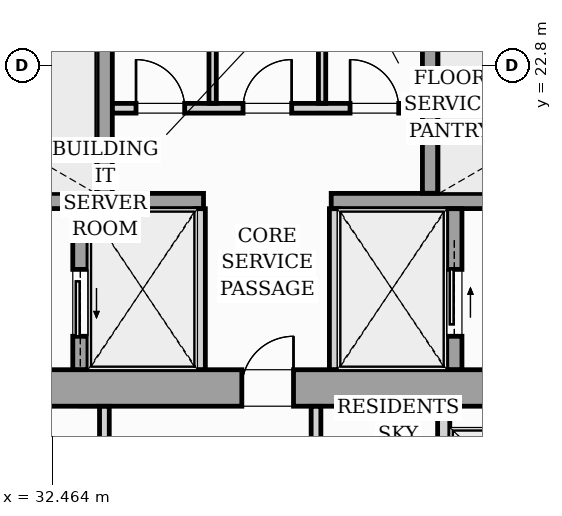
"""IFC4 building model, lengths in metres.
Left out: names, types, materials, properties, quantities, classifications, styles, units other than length and angle.
Written with IfcOpenShell. Run it as: python <this file> out.ifc"""

import sys

from ifc_helpers import new_model, si_unit, direction, frame, frame_2d, origin, origin_2d, place, context, subcontext, project, spatial, rectangle, i_section, extrude, source, transform, mapped, element, fill, save


model = new_model("IFC4")
c1 = context("Model", 3, precision=1e-05, world=origin(), true_north=direction((0.0, 1.0)))
c2 = subcontext(c1, "Body", "Model", "MODEL_VIEW")
j1 = project(units=[si_unit("LENGTHUNIT", "METRE"), si_unit("PLANEANGLEUNIT", "RADIAN")], contexts=[c1])
p1 = place(None, origin())
s1 = spatial("IfcSite", under=j1, at=p1, CompositionType="ELEMENT")
p2 = place(p1, origin())
s2 = spatial("IfcBuilding", under=s1, at=p2, CompositionType="ELEMENT")
p3 = place(p2, frame((0.0, 0.0, 219.9)))
s3 = spatial("IfcBuildingStorey", under=s2, at=p3, CompositionType="ELEMENT", Elevation=219.9)
m1 = source(origin(), c2, "Body", "SweptSolid", [
    extrude(i_section(OverallWidth=0.409, OverallDepth=0.425, WebThickness=0.033, FlangeThickness=0.052, FilletRadius=0.018, at=origin_2d()), origin(), (0.0, 0.0, 1.0), 3.296),
])
for number, where, z_axis, x_axis in (
    (1, (33.12, 17.4, 0.002), (0.0, 0.0, 1.0), (1.0, 0.0, 0.0)),
    (2, (38.88, 17.4, 0.002), (0.0, 0.0, 1.0), (1.0, 0.0, 0.0)),
):
    element("IfcColumn", number, at=place(p3, frame(where, z_axis=z_axis, x_axis=x_axis)), inside=s3, PredefinedType="PILASTER", context=c2, shape_type="MappedRepresentation", body=[
        mapped(m1, transform((0.0, 0.0, 0.0), scale=1.0)),
    ])
p4 = place(p3, frame((26.2, 17.5, 0.0), z_axis=(0.0, 0.0, 1.0), x_axis=(1.0, 0.0, 0.0)))
e3 = element("IfcWall", 3, at=p4, inside=s3, PredefinedType="SHEAR", context=c2, shape_type="SweptSolid", body=[
    extrude(rectangle(XDim=19.6, YDim=0.6, at=frame_2d((9.8, 0.0))), origin(), (0.0, 0.0, 1.0), 3.3),
])
p5 = place(p4, frame((0.95, 0.0, 0.0)))
e4 = element("IfcOpeningElement", 4, at=p5, cuts=e3, PredefinedType="OPENING", context=c2, shape_type="SweptSolid", body=[
    extrude(rectangle(XDim=0.95, YDim=2.06, at=frame_2d((0.475, 1.03))), frame((0.0, 0.31, 0.0), z_axis=(0.0, -1.0, 0.0), x_axis=(1.0, 0.0, 0.0)), (0.0, 0.0, 1.0), 0.62),
])
p6 = place(p4, frame((9.38, 0.0, 0.0)))
e5 = element("IfcOpeningElement", 5, at=p6, cuts=e3, PredefinedType="OPENING", context=c2, shape_type="SweptSolid", body=[
    extrude(rectangle(XDim=0.85, YDim=2.0, at=frame_2d((0.425, 1.0))), frame((0.0, 0.31, 0.0), z_axis=(0.0, -1.0, 0.0), x_axis=(1.0, 0.0, 0.0)), (0.0, 0.0, 1.0), 0.62),
])
p7 = place(p4, frame((17.55, 0.0, 0.0)))
e6 = element("IfcOpeningElement", 6, at=p7, cuts=e3, PredefinedType="OPENING", context=c2, shape_type="SweptSolid", body=[
    extrude(rectangle(XDim=0.95, YDim=2.06, at=frame_2d((0.475, 1.03))), frame((0.0, 0.31, 0.0), z_axis=(0.0, -1.0, 0.0), x_axis=(1.0, 0.0, 0.0)), (0.0, 0.0, 1.0), 0.62),
])
p8 = place(p3, frame((26.802, 20.575, 0.0), z_axis=(0.0, 0.0, 1.0), x_axis=(1.0, 0.0, 0.0)))
e7 = element("IfcWall", 7, at=p8, inside=s3, PredefinedType="SOLIDWALL", context=c2, shape_type="SweptSolid", body=[
    extrude(rectangle(XDim=8.148, YDim=0.25, at=frame_2d((4.074, 0.0))), origin(), (0.0, 0.0, 1.0), 3.3),
])
p9 = place(p8, frame((0.298, 0.0, 0.0)))
e8 = element("IfcOpeningElement", 8, at=p9, cuts=e7, PredefinedType="OPENING", context=c2, shape_type="SweptSolid", body=[
    extrude(rectangle(XDim=0.95, YDim=2.06, at=frame_2d((0.475, 1.03))), frame((0.0, 0.135, 0.0), z_axis=(0.0, -1.0, 0.0), x_axis=(1.0, 0.0, 0.0)), (0.0, 0.0, 1.0), 0.27),
])
p10 = place(p3, frame((37.05, 20.575, 0.0), z_axis=(0.0, 0.0, 1.0), x_axis=(1.0, 0.0, 0.0)))
e9 = element("IfcWall", 9, at=p10, inside=s3, PredefinedType="SOLIDWALL", context=c2, shape_type="SweptSolid", body=[
    extrude(rectangle(XDim=8.148, YDim=0.25, at=frame_2d((4.074, 0.0))), origin(), (0.0, 0.0, 1.0), 3.3),
])
p11 = place(p10, frame((6.6, 0.0, 0.0)))
e10 = element("IfcOpeningElement", 10, at=p11, cuts=e9, PredefinedType="OPENING", context=c2, shape_type="SweptSolid", body=[
    extrude(rectangle(XDim=0.95, YDim=2.06, at=frame_2d((0.475, 1.03))), frame((0.0, 0.135, 0.0), z_axis=(0.0, -1.0, 0.0), x_axis=(1.0, 0.0, 0.0)), (0.0, 0.0, 1.0), 0.27),
])
for number, where, z_axis, x_axis in (
    (11, (33.325, 20.702, 0.0), (0.0, 0.0, 1.0), (0.0, 1.0, 0.0)),
    (12, (38.675, 20.702, 0.0), (0.0, 0.0, 1.0), (0.0, 1.0, 0.0)),
):
    element("IfcWall", number, at=place(p3, frame(where, z_axis=z_axis, x_axis=x_axis)), inside=s3, PredefinedType="SOLIDWALL", context=c2, shape_type="SweptSolid", body=[
        extrude(rectangle(XDim=2.896, YDim=0.25, at=frame_2d((1.448, 0.0))), origin(), (0.0, 0.0, 1.0), 3.3),
    ])
p12 = place(p3, frame((32.925, 17.802, 0.0), z_axis=(0.0, 0.0, 1.0), x_axis=(0.0, 1.0, 0.0)))
e13 = element("IfcWall", 13, at=p12, inside=s3, PredefinedType="SOLIDWALL", context=c2, shape_type="SweptSolid", body=[
    extrude(rectangle(XDim=2.646, YDim=0.25, at=frame_2d((1.323, 0.0))), origin(), (0.0, 0.0, 1.0), 3.3),
])
p13 = place(p12, frame((0.548, 0.0, 0.0)))
e14 = element("IfcOpeningElement", 14, at=p13, cuts=e13, PredefinedType="OPENING", context=c2, shape_type="SweptSolid", body=[
    extrude(rectangle(XDim=1.1, YDim=2.08, at=frame_2d((0.55, 1.04))), frame((0.0, 0.135, 0.0), z_axis=(0.0, -1.0, 0.0), x_axis=(1.0, 0.0, 0.0)), (0.0, 0.0, 1.0), 0.27),
])
for number, where, z_axis, x_axis in (
    (15, (34.9, 17.802, 0.0), (0.0, 0.0, 1.0), (0.0, 1.0, 0.0)),
    (16, (37.1, 17.802, 0.0), (0.0, 0.0, 1.0), (0.0, 1.0, 0.0)),
):
    element("IfcWall", number, at=place(p3, frame(where, z_axis=z_axis, x_axis=x_axis)), inside=s3, PredefinedType="PARTITIONING", context=c2, shape_type="SweptSolid", body=[
        extrude(rectangle(XDim=2.646, YDim=0.16, at=frame_2d((1.323, 0.0))), origin(), (0.0, 0.0, 1.0), 3.04),
    ])
p14 = place(p3, frame((39.075, 17.802, 0.0), z_axis=(0.0, 0.0, 1.0), x_axis=(0.0, 1.0, 0.0)))
e17 = element("IfcWall", 17, at=p14, inside=s3, PredefinedType="SOLIDWALL", context=c2, shape_type="SweptSolid", body=[
    extrude(rectangle(XDim=2.646, YDim=0.25, at=frame_2d((1.323, 0.0))), origin(), (0.0, 0.0, 1.0), 3.3),
])
p15 = place(p14, frame((0.548, 0.0, 0.0)))
e18 = element("IfcOpeningElement", 18, at=p15, cuts=e17, PredefinedType="OPENING", context=c2, shape_type="SweptSolid", body=[
    extrude(rectangle(XDim=1.1, YDim=2.08, at=frame_2d((0.55, 1.04))), frame((0.0, 0.135, 0.0), z_axis=(0.0, -1.0, 0.0), x_axis=(1.0, 0.0, 0.0)), (0.0, 0.0, 1.0), 0.27),
])
p16 = place(p3, frame((33.452, 22.1, 0.0), z_axis=(0.0, 0.0, 1.0), x_axis=(1.0, 0.0, 0.0)))
e19 = element("IfcWall", 19, at=p16, inside=s3, PredefinedType="PARTITIONING", context=c2, shape_type="SweptSolid", body=[
    extrude(rectangle(XDim=5.096, YDim=0.16, at=frame_2d((2.548, 0.0))), origin(), (0.0, 0.0, 1.0), 3.04),
])
p17 = place(p16, frame((0.388, 0.0, 0.0)))
e20 = element("IfcOpeningElement", 20, at=p17, cuts=e19, PredefinedType="OPENING", context=c2, shape_type="SweptSolid", body=[
    extrude(rectangle(XDim=0.8, YDim=2.05, at=frame_2d((0.4, 1.025))), frame((0.0, 0.09, 0.0), z_axis=(0.0, -1.0, 0.0), x_axis=(1.0, 0.0, 0.0)), (0.0, 0.0, 1.0), 0.18),
])
p18 = place(p16, frame((2.148, 0.0, 0.0)))
e21 = element("IfcOpeningElement", 21, at=p18, cuts=e19, PredefinedType="OPENING", context=c2, shape_type="SweptSolid", body=[
    extrude(rectangle(XDim=0.8, YDim=2.05, at=frame_2d((0.4, 1.025))), frame((0.0, 0.09, 0.0), z_axis=(0.0, -1.0, 0.0), x_axis=(1.0, 0.0, 0.0)), (0.0, 0.0, 1.0), 0.18),
])
p19 = place(p16, frame((3.908, 0.0, 0.0)))
e22 = element("IfcOpeningElement", 22, at=p19, cuts=e19, PredefinedType="OPENING", context=c2, shape_type="SweptSolid", body=[
    extrude(rectangle(XDim=0.8, YDim=2.05, at=frame_2d((0.4, 1.025))), frame((0.0, 0.09, 0.0), z_axis=(0.0, -1.0, 0.0), x_axis=(1.0, 0.0, 0.0)), (0.0, 0.0, 1.0), 0.18),
])
for number, where, z_axis, x_axis in (
    (23, (35.1, 22.182, 0.0), (0.0, 0.0, 1.0), (0.0, 1.0, 0.0)),
    (24, (36.9, 22.182, 0.0), (0.0, 0.0, 1.0), (0.0, 1.0, 0.0)),
):
    element("IfcWall", number, at=place(p3, frame(where, z_axis=z_axis, x_axis=x_axis)), inside=s3, PredefinedType="PARTITIONING", context=c2, shape_type="SweptSolid", body=[
        extrude(rectangle(XDim=1.416, YDim=0.12, at=frame_2d((0.708, 0.0))), origin(), (0.0, 0.0, 1.0), 3.04),
    ])
p20 = place(p3, frame((38.9, 14.75, 0.0), z_axis=(0.0, 0.0, 1.0), x_axis=(0.0, 1.0, 0.0)))
e25 = element("IfcWall", 25, at=p20, inside=s3, PredefinedType="PARTITIONING", context=c2, shape_type="SweptSolid", body=[
    extrude(rectangle(XDim=2.35, YDim=0.2, at=frame_2d((1.175, 0.0))), origin(), (0.0, 0.0, 1.0), 3.04),
])
for number, where, z_axis, x_axis in (
    (26, (33.32, 14.7, 0.0), (0.0, 0.0, 1.0), (0.0, 1.0, 0.0)),
    (27, (36.8, 14.7, 0.0), (0.0, 0.0, 1.0), (0.0, 1.0, 0.0)),
):
    element("IfcWall", number, at=place(p3, frame(where, z_axis=z_axis, x_axis=x_axis)), inside=s3, PredefinedType="PARTITIONING", context=c2, shape_type="SweptSolid", body=[
        extrude(rectangle(XDim=2.498, YDim=0.16, at=frame_2d((1.249, 0.0))), origin(), (0.0, 0.0, 1.0), 3.04),
    ])
m2 = source(origin(), c2, "Body", "SweptSolid", [
    extrude(rectangle(XDim=0.85, YDim=2.0, at=frame_2d((0.425, 1.0))), frame((0.0, 0.025, 0.0), z_axis=(0.0, -1.0, 0.0), x_axis=(1.0, 0.0, 0.0)), (0.0, 0.0, 1.0), 0.05),
])
p21 = place(p6, origin())
e28 = element("IfcDoor", 28, at=p21, inside=s3, OperationType="SINGLE_SWING_RIGHT", PredefinedType="DOOR", context=c2, shape_type="MappedRepresentation", body=[
    mapped(m2, transform((0.0, 0.0, 0.0), scale=1.0)),
])
fill(e5, e28)
m3 = source(origin(), c2, "Body", "SweptSolid", [
    extrude(rectangle(XDim=1.1, YDim=2.08, at=frame_2d((0.55, 1.04))), frame((0.0, 0.025, 0.0), z_axis=(0.0, -1.0, 0.0), x_axis=(1.0, 0.0, 0.0)), (0.0, 0.0, 1.0), 0.05),
])
p22 = place(p13, origin())
e29 = element("IfcDoor", 29, at=p22, inside=s3, OperationType="SLIDING_TO_LEFT", PredefinedType="DOOR", context=c2, shape_type="MappedRepresentation", body=[
    mapped(m3, transform((0.0, 0.0, 0.0), scale=1.0)),
])
fill(e14, e29)
p23 = place(p15, origin())
e30 = element("IfcDoor", 30, at=p23, inside=s3, OperationType="SLIDING_TO_RIGHT", PredefinedType="DOOR", context=c2, shape_type="MappedRepresentation", body=[
    mapped(m3, transform((0.0, 0.0, 0.0), scale=1.0)),
])
fill(e18, e30)
m4 = source(origin(), c2, "Body", "SweptSolid", [
    extrude(rectangle(XDim=0.8, YDim=2.05, at=frame_2d((0.4, 1.025))), frame((0.0, 0.025, 0.0), z_axis=(0.0, -1.0, 0.0), x_axis=(1.0, 0.0, 0.0)), (0.0, 0.0, 1.0), 0.05),
])
p24 = place(p17, origin())
e31 = element("IfcDoor", 31, at=p24, inside=s3, OperationType="SINGLE_SWING_LEFT", PredefinedType="DOOR", context=c2, shape_type="MappedRepresentation", body=[
    mapped(m4, transform((0.0, 0.0, 0.0), scale=1.0)),
])
fill(e20, e31)
p25 = place(p18, origin())
e32 = element("IfcDoor", 32, at=p25, inside=s3, OperationType="SINGLE_SWING_RIGHT", PredefinedType="DOOR", context=c2, shape_type="MappedRepresentation", body=[
    mapped(m4, transform((0.0, 0.0, 0.0), scale=1.0)),
])
fill(e21, e32)
p26 = place(p19, origin())
e33 = element("IfcDoor", 33, at=p26, inside=s3, OperationType="SINGLE_SWING_LEFT", PredefinedType="DOOR", context=c2, shape_type="MappedRepresentation", body=[
    mapped(m4, transform((0.0, 0.0, 0.0), scale=1.0)),
])
fill(e22, e33)
save(model, sys.argv[1])
